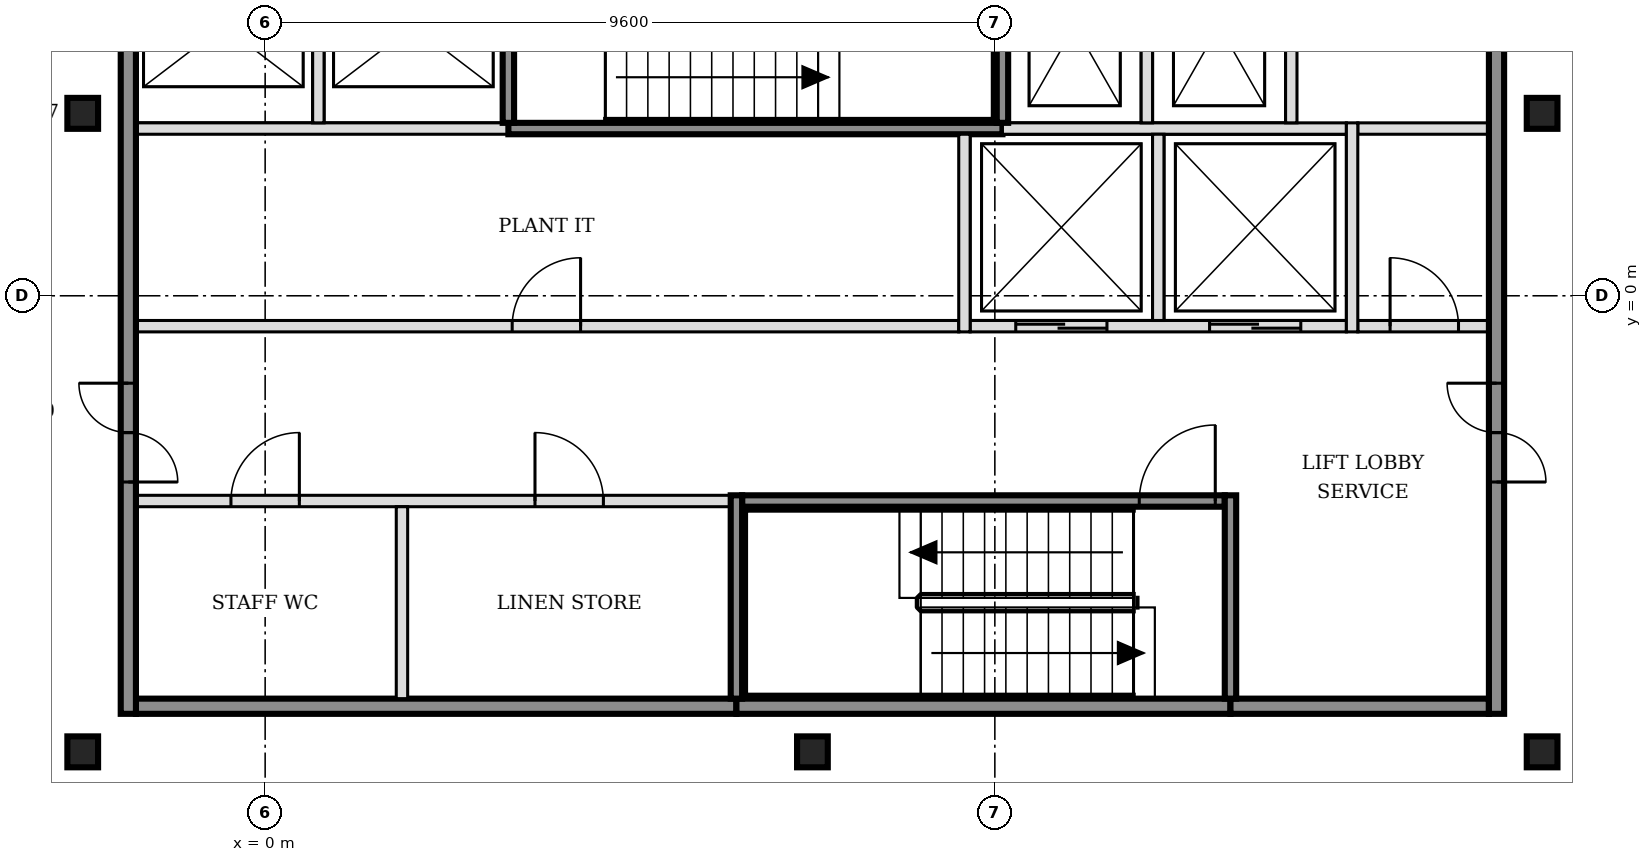
"""IFC4 building model, lengths in metres.
Left out: names, types, materials, properties, quantities, classifications, styles, units other than length and angle.
Written with IfcOpenShell. Run it as: python <this file> out.ifc"""

import sys

from ifc_helpers import new_model, si_unit, direction, frame, frame_2d, origin, origin_2d, place, context, subcontext, project, spatial, rectangle, i_section, extrude, element, fill, save


model = new_model("IFC4")
c1 = context("Model", 3, precision=1e-05, world=origin(), true_north=direction((0.0, 1.0)))
c2 = subcontext(c1, "Body", "Model", "MODEL_VIEW")
j1 = project(units=[si_unit("LENGTHUNIT", "METRE"), si_unit("PLANEANGLEUNIT", "RADIAN")], contexts=[c1])
p1 = place(None, origin())
s1 = spatial("IfcSite", under=j1, at=p1, CompositionType="ELEMENT")
p2 = place(p1, origin())
s2 = spatial("IfcBuilding", under=s1, at=p2, CompositionType="ELEMENT")
p3 = place(p2, frame((0.0, 0.0, 201.0)))
s3 = spatial("IfcBuildingStorey", under=s2, at=p3, CompositionType="ELEMENT", Elevation=201.0)
for number, where, z_axis, x_axis in (
    (1, (-2.4, -6.0, -0.15), (0.0, 0.0, 1.0), (1.0, 0.0, 0.0)),
    (2, (7.2, -6.0, -0.15), (0.0, 0.0, 1.0), (1.0, 0.0, 0.0)),
    (3, (16.8, -6.0, -0.15), (0.0, 0.0, 1.0), (1.0, 0.0, 0.0)),
    (4, (-2.4, 2.4, -0.15), (0.0, 0.0, 1.0), (1.0, 0.0, 0.0)),
    (5, (16.8, 2.4, -0.15), (0.0, 0.0, 1.0), (1.0, 0.0, 0.0)),
):
    element("IfcColumn", number, at=place(p3, frame(where, z_axis=z_axis, x_axis=x_axis)), inside=s3, PredefinedType="COLUMN", context=c2, shape_type="SweptSolid", body=[
        extrude(i_section(OverallWidth=0.404, OverallDepth=0.407, WebThickness=0.027, FlangeThickness=0.044, FilletRadius=0.015, at=origin_2d()), origin(), (0.0, 0.0, 1.0), 3.5),
    ])
p4 = place(p3, frame((-1.7, -5.4, 0.0), z_axis=(0.0, 0.0, 1.0), x_axis=(1.0, 0.0, 0.0)))
e6 = element("IfcWall", 6, at=p4, inside=s3, PredefinedType="SOLIDWALL", context=c2, shape_type="SweptSolid", body=[
    extrude(rectangle(XDim=7.9, YDim=0.2, at=frame_2d((3.95, 0.0))), origin(), (0.0, 0.0, 1.0), 3.35),
])
p5 = place(p3, frame((6.2, -5.4, 0.0), z_axis=(0.0, 0.0, 1.0), x_axis=(1.0, 0.0, 0.0)))
e7 = element("IfcWall", 7, at=p5, inside=s3, PredefinedType="SOLIDWALL", context=c2, shape_type="SweptSolid", body=[
    extrude(rectangle(XDim=6.5, YDim=0.2, at=frame_2d((3.25, 0.0))), origin(), (0.0, 0.0, 1.0), 3.35),
])
p6 = place(p3, frame((12.7, -5.4, 0.0), z_axis=(0.0, 0.0, 1.0), x_axis=(1.0, 0.0, 0.0)))
e8 = element("IfcWall", 8, at=p6, inside=s3, PredefinedType="SOLIDWALL", context=c2, shape_type="SweptSolid", body=[
    extrude(rectangle(XDim=3.4, YDim=0.2, at=frame_2d((1.7, 0.0))), origin(), (0.0, 0.0, 1.0), 3.35),
])
p7 = place(p3, frame((-1.7, -2.7, 0.0), z_axis=(0.0, 0.0, 1.0), x_axis=(1.0, 0.0, 0.0)))
e9 = element("IfcWall", 9, at=p7, inside=s3, PredefinedType="PARTITIONING", context=c2, shape_type="SweptSolid", body=[
    extrude(rectangle(XDim=7.825, YDim=0.15, at=frame_2d((3.913, 0.0))), origin(), (0.0, 0.0, 1.0), 3.35),
])
p8 = place(p7, frame((1.25, 0.0, 0.0)))
e10 = element("IfcOpeningElement", 10, at=p8, cuts=e9, PredefinedType="OPENING", context=c2, shape_type="SweptSolid", body=[
    extrude(rectangle(XDim=0.9, YDim=2.1, at=frame_2d((0.45, 1.05))), frame((0.0, 0.085, 0.0), z_axis=(0.0, -1.0, 0.0), x_axis=(1.0, 0.0, 0.0)), (0.0, 0.0, 1.0), 0.17),
])
p9 = place(p7, frame((5.25, 0.0, 0.0)))
e11 = element("IfcOpeningElement", 11, at=p9, cuts=e9, PredefinedType="OPENING", context=c2, shape_type="SweptSolid", body=[
    extrude(rectangle(XDim=0.9, YDim=2.1, at=frame_2d((0.45, 1.05))), frame((0.0, 0.085, 0.0), z_axis=(0.0, -1.0, 0.0), x_axis=(1.0, 0.0, 0.0)), (0.0, 0.0, 1.0), 0.17),
])
p10 = place(p3, frame((6.275, -2.7, 0.0), z_axis=(0.0, 0.0, 1.0), x_axis=(1.0, 0.0, 0.0)))
e12 = element("IfcWall", 12, at=p10, inside=s3, PredefinedType="SOLIDWALL", context=c2, shape_type="SweptSolid", body=[
    extrude(rectangle(XDim=6.35, YDim=0.15, at=frame_2d((3.175, 0.0))), origin(), (0.0, 0.0, 1.0), 3.35),
])
p11 = place(p10, frame((5.225, 0.0, 0.0)))
e13 = element("IfcOpeningElement", 13, at=p11, cuts=e12, PredefinedType="OPENING", context=c2, shape_type="SweptSolid", body=[
    extrude(rectangle(XDim=1.0, YDim=2.1, at=frame_2d((0.5, 1.05))), frame((0.0, 0.085, 0.0), z_axis=(0.0, -1.0, 0.0), x_axis=(1.0, 0.0, 0.0)), (0.0, 0.0, 1.0), 0.17),
])
p12 = place(p3, frame((-1.7, -0.4, 0.0), z_axis=(0.0, 0.0, 1.0), x_axis=(1.0, 0.0, 0.0)))
e14 = element("IfcWall", 14, at=p12, inside=s3, PredefinedType="PARTITIONING", context=c2, shape_type="SweptSolid", body=[
    extrude(rectangle(XDim=10.825, YDim=0.15, at=frame_2d((5.413, 0.0))), origin(), (0.0, 0.0, 1.0), 3.35),
])
p13 = place(p12, frame((4.95, 0.0, 0.0)))
e15 = element("IfcOpeningElement", 15, at=p13, cuts=e14, PredefinedType="OPENING", context=c2, shape_type="SweptSolid", body=[
    extrude(rectangle(XDim=0.9, YDim=2.1, at=frame_2d((0.45, 1.05))), frame((0.0, 0.085, 0.0), z_axis=(0.0, -1.0, 0.0), x_axis=(1.0, 0.0, 0.0)), (0.0, 0.0, 1.0), 0.17),
])
p14 = place(p3, frame((9.275, -0.4, 0.0), z_axis=(0.0, 0.0, 1.0), x_axis=(1.0, 0.0, 0.0)))
e16 = element("IfcWall", 16, at=p14, inside=s3, PredefinedType="SOLIDWALL", context=c2, shape_type="SweptSolid", body=[
    extrude(rectangle(XDim=4.95, YDim=0.15, at=frame_2d((2.475, 0.0))), origin(), (0.0, 0.0, 1.0), 3.35),
])
p15 = place(p14, frame((0.6, 0.0, 0.0)))
e17 = element("IfcOpeningElement", 17, at=p15, cuts=e16, PredefinedType="OPENING", context=c2, shape_type="SweptSolid", body=[
    extrude(rectangle(XDim=1.2, YDim=2.1, at=frame_2d((0.6, 1.05))), frame((0.0, 0.085, 0.0), z_axis=(0.0, -1.0, 0.0), x_axis=(1.0, 0.0, 0.0)), (0.0, 0.0, 1.0), 0.17),
])
p16 = place(p14, frame((3.15, 0.0, 0.0)))
e18 = element("IfcOpeningElement", 18, at=p16, cuts=e16, PredefinedType="OPENING", context=c2, shape_type="SweptSolid", body=[
    extrude(rectangle(XDim=1.2, YDim=2.1, at=frame_2d((0.6, 1.05))), frame((0.0, 0.085, 0.0), z_axis=(0.0, -1.0, 0.0), x_axis=(1.0, 0.0, 0.0)), (0.0, 0.0, 1.0), 0.17),
])
p17 = place(p3, frame((14.375, -0.4, 0.0), z_axis=(0.0, 0.0, 1.0), x_axis=(1.0, 0.0, 0.0)))
e19 = element("IfcWall", 19, at=p17, inside=s3, PredefinedType="PARTITIONING", context=c2, shape_type="SweptSolid", body=[
    extrude(rectangle(XDim=1.725, YDim=0.15, at=frame_2d((0.863, 0.0))), origin(), (0.0, 0.0, 1.0), 3.35),
])
p18 = place(p17, frame((0.425, 0.0, 0.0)))
e20 = element("IfcOpeningElement", 20, at=p18, cuts=e19, PredefinedType="OPENING", context=c2, shape_type="SweptSolid", body=[
    extrude(rectangle(XDim=0.9, YDim=2.1, at=frame_2d((0.45, 1.05))), frame((0.0, 0.085, 0.0), z_axis=(0.0, -1.0, 0.0), x_axis=(1.0, 0.0, 0.0)), (0.0, 0.0, 1.0), 0.17),
])
p19 = place(p3, frame((-1.7, 2.2, 0.0), z_axis=(0.0, 0.0, 1.0), x_axis=(1.0, 0.0, 0.0)))
e21 = element("IfcWall", 21, at=p19, inside=s3, PredefinedType="SOLIDWALL", context=c2, shape_type="SweptSolid", body=[
    extrude(rectangle(XDim=4.9, YDim=0.15, at=frame_2d((2.45, 0.0))), origin(), (0.0, 0.0, 1.0), 3.35),
])
p20 = place(p3, frame((3.2, 2.2, 0.0), z_axis=(0.0, 0.0, 1.0), x_axis=(1.0, 0.0, 0.0)))
e22 = element("IfcWall", 22, at=p20, inside=s3, PredefinedType="SOLIDWALL", context=c2, shape_type="SweptSolid", body=[
    extrude(rectangle(XDim=6.5, YDim=0.15, at=frame_2d((3.25, 0.0))), origin(), (0.0, 0.0, 1.0), 3.35),
])
p21 = place(p3, frame((9.7, 2.2, 0.0), z_axis=(0.0, 0.0, 1.0), x_axis=(1.0, 0.0, 0.0)))
e23 = element("IfcWall", 23, at=p21, inside=s3, PredefinedType="SOLIDWALL", context=c2, shape_type="SweptSolid", body=[
    extrude(rectangle(XDim=4.525, YDim=0.15, at=frame_2d((2.263, 0.0))), origin(), (0.0, 0.0, 1.0), 3.35),
])
p22 = place(p3, frame((14.375, 2.2, 0.0), z_axis=(0.0, 0.0, 1.0), x_axis=(1.0, 0.0, 0.0)))
e24 = element("IfcWall", 24, at=p22, inside=s3, PredefinedType="PARTITIONING", context=c2, shape_type="SweptSolid", body=[
    extrude(rectangle(XDim=1.725, YDim=0.15, at=frame_2d((0.863, 0.0))), origin(), (0.0, 0.0, 1.0), 3.35),
])
p23 = place(p3, frame((-1.8, -5.5, 0.0), z_axis=(0.0, 0.0, 1.0), x_axis=(0.0, 1.0, 0.0)))
e25 = element("IfcWall", 25, at=p23, inside=s3, PredefinedType="SOLIDWALL", context=c2, shape_type="SweptSolid", body=[
    extrude(rectangle(XDim=15.8, YDim=0.2, at=frame_2d((7.9, 0.0))), origin(), (0.0, 0.0, 1.0), 3.35),
])
p24 = place(p23, frame((3.05, 0.0, 0.0)))
e26 = element("IfcOpeningElement", 26, at=p24, cuts=e25, PredefinedType="OPENING", context=c2, shape_type="SweptSolid", body=[
    extrude(rectangle(XDim=1.3, YDim=2.1, at=frame_2d((0.65, 1.05))), frame((0.0, 0.11, 0.0), z_axis=(0.0, -1.0, 0.0), x_axis=(1.0, 0.0, 0.0)), (0.0, 0.0, 1.0), 0.22),
])
p25 = place(p23, frame((11.45, 0.0, 0.0)))
e27 = element("IfcOpeningElement", 27, at=p25, cuts=e25, PredefinedType="OPENING", context=c2, shape_type="SweptSolid", body=[
    extrude(rectangle(XDim=1.3, YDim=2.1, at=frame_2d((0.65, 1.05))), frame((0.0, 0.11, 0.0), z_axis=(0.0, -1.0, 0.0), x_axis=(1.0, 0.0, 0.0)), (0.0, 0.0, 1.0), 0.22),
])
p26 = place(p3, frame((0.7, 2.275, 0.0), z_axis=(0.0, 0.0, 1.0), x_axis=(0.0, 1.0, 0.0)))
e28 = element("IfcWall", 28, at=p26, inside=s3, PredefinedType="SOLIDWALL", context=c2, shape_type="SweptSolid", body=[
    extrude(rectangle(XDim=2.55, YDim=0.15, at=frame_2d((1.275, 0.0))), origin(), (0.0, 0.0, 1.0), 3.35),
])
p27 = place(p3, frame((1.8, -5.3, 0.0), z_axis=(0.0, 0.0, 1.0), x_axis=(0.0, 1.0, 0.0)))
e29 = element("IfcWall", 29, at=p27, inside=s3, PredefinedType="PARTITIONING", context=c2, shape_type="SweptSolid", body=[
    extrude(rectangle(XDim=2.525, YDim=0.15, at=frame_2d((1.263, 0.0))), origin(), (0.0, 0.0, 1.0), 3.35),
])
p28 = place(p3, frame((3.2, 2.275, 0.0), z_axis=(0.0, 0.0, 1.0), x_axis=(0.0, 1.0, 0.0)))
e30 = element("IfcWall", 30, at=p28, inside=s3, PredefinedType="SOLIDWALL", context=c2, shape_type="SweptSolid", body=[
    extrude(rectangle(XDim=2.55, YDim=0.15, at=frame_2d((1.275, 0.0))), origin(), (0.0, 0.0, 1.0), 3.35),
])
p29 = place(p3, frame((6.2, -5.3, 0.0), z_axis=(0.0, 0.0, 1.0), x_axis=(0.0, 1.0, 0.0)))
e31 = element("IfcWall", 31, at=p29, inside=s3, PredefinedType="SOLIDWALL", context=c2, shape_type="SweptSolid", body=[
    extrude(rectangle(XDim=2.675, YDim=0.15, at=frame_2d((1.337, 0.0))), origin(), (0.0, 0.0, 1.0), 3.35),
])
p30 = place(p3, frame((9.2, -0.475, 0.0), z_axis=(0.0, 0.0, 1.0), x_axis=(0.0, 1.0, 0.0)))
e32 = element("IfcWall", 32, at=p30, inside=s3, PredefinedType="SOLIDWALL", context=c2, shape_type="SweptSolid", body=[
    extrude(rectangle(XDim=2.6, YDim=0.15, at=frame_2d((1.3, 0.0))), origin(), (0.0, 0.0, 1.0), 3.35),
])
for number, where, z_axis, x_axis in (
    (33, (9.7, 2.275, 0.0), (0.0, 0.0, 1.0), (0.0, 1.0, 0.0)),
    (34, (11.6, 2.275, 0.0), (0.0, 0.0, 1.0), (0.0, 1.0, 0.0)),
):
    element("IfcWall", number, at=place(p3, frame(where, z_axis=z_axis, x_axis=x_axis)), inside=s3, PredefinedType="SOLIDWALL", context=c2, shape_type="SweptSolid", body=[
        extrude(rectangle(XDim=2.55, YDim=0.15, at=frame_2d((1.275, 0.0))), origin(), (0.0, 0.0, 1.0), 3.35),
    ])
p31 = place(p3, frame((11.75, -0.325, 0.0), z_axis=(0.0, 0.0, 1.0), x_axis=(0.0, 1.0, 0.0)))
e35 = element("IfcWall", 35, at=p31, inside=s3, PredefinedType="SOLIDWALL", context=c2, shape_type="SweptSolid", body=[
    extrude(rectangle(XDim=2.45, YDim=0.15, at=frame_2d((1.225, 0.0))), origin(), (0.0, 0.0, 1.0), 3.35),
])
p32 = place(p3, frame((12.7, -5.3, 0.0), z_axis=(0.0, 0.0, 1.0), x_axis=(0.0, 1.0, 0.0)))
e36 = element("IfcWall", 36, at=p32, inside=s3, PredefinedType="SOLIDWALL", context=c2, shape_type="SweptSolid", body=[
    extrude(rectangle(XDim=2.675, YDim=0.15, at=frame_2d((1.337, 0.0))), origin(), (0.0, 0.0, 1.0), 3.35),
])
p33 = place(p3, frame((13.5, 2.275, 0.0), z_axis=(0.0, 0.0, 1.0), x_axis=(0.0, 1.0, 0.0)))
e37 = element("IfcWall", 37, at=p33, inside=s3, PredefinedType="SOLIDWALL", context=c2, shape_type="SweptSolid", body=[
    extrude(rectangle(XDim=2.55, YDim=0.15, at=frame_2d((1.275, 0.0))), origin(), (0.0, 0.0, 1.0), 3.35),
])
p34 = place(p3, frame((14.3, -0.475, 0.0), z_axis=(0.0, 0.0, 1.0), x_axis=(0.0, 1.0, 0.0)))
e38 = element("IfcWall", 38, at=p34, inside=s3, PredefinedType="SOLIDWALL", context=c2, shape_type="SweptSolid", body=[
    extrude(rectangle(XDim=2.75, YDim=0.15, at=frame_2d((1.375, 0.0))), origin(), (0.0, 0.0, 1.0), 3.35),
])
p35 = place(p3, frame((16.2, -5.5, 0.0), z_axis=(0.0, 0.0, 1.0), x_axis=(0.0, 1.0, 0.0)))
e39 = element("IfcWall", 39, at=p35, inside=s3, PredefinedType="SOLIDWALL", context=c2, shape_type="SweptSolid", body=[
    extrude(rectangle(XDim=15.8, YDim=0.2, at=frame_2d((7.9, 0.0))), origin(), (0.0, 0.0, 1.0), 3.35),
])
p36 = place(p35, frame((3.05, 0.0, 0.0)))
e40 = element("IfcOpeningElement", 40, at=p36, cuts=e39, PredefinedType="OPENING", context=c2, shape_type="SweptSolid", body=[
    extrude(rectangle(XDim=1.3, YDim=2.1, at=frame_2d((0.65, 1.05))), frame((0.0, 0.11, 0.0), z_axis=(0.0, -1.0, 0.0), x_axis=(1.0, 0.0, 0.0)), (0.0, 0.0, 1.0), 0.22),
])
p37 = place(p35, frame((11.45, 0.0, 0.0)))
e41 = element("IfcOpeningElement", 41, at=p37, cuts=e39, PredefinedType="OPENING", context=c2, shape_type="SweptSolid", body=[
    extrude(rectangle(XDim=1.3, YDim=2.1, at=frame_2d((0.65, 1.05))), frame((0.0, 0.11, 0.0), z_axis=(0.0, -1.0, 0.0), x_axis=(1.0, 0.0, 0.0)), (0.0, 0.0, 1.0), 0.22),
])
p38 = place(p15, origin())
e42 = element("IfcDoor", 42, at=p38, inside=s3, OperationType="DOUBLE_DOOR_SLIDING", PredefinedType="DOOR", context=c2, shape_type="SweptSolid", body=[
    extrude(rectangle(XDim=1.2, YDim=2.1, at=frame_2d((0.6, 1.05))), frame((0.0, 0.025, 0.0), z_axis=(0.0, -1.0, 0.0), x_axis=(1.0, 0.0, 0.0)), (0.0, 0.0, 1.0), 0.05),
])
fill(e17, e42)
p39 = place(p16, origin())
e43 = element("IfcDoor", 43, at=p39, inside=s3, OperationType="DOUBLE_DOOR_SLIDING", PredefinedType="DOOR", context=c2, shape_type="SweptSolid", body=[
    extrude(rectangle(XDim=1.2, YDim=2.1, at=frame_2d((0.6, 1.05))), frame((0.0, 0.025, 0.0), z_axis=(0.0, -1.0, 0.0), x_axis=(1.0, 0.0, 0.0)), (0.0, 0.0, 1.0), 0.05),
])
fill(e18, e43)
p40 = place(p11, origin())
e44 = element("IfcDoor", 44, at=p40, inside=s3, OperationType="SINGLE_SWING_RIGHT", PredefinedType="DOOR", context=c2, shape_type="SweptSolid", body=[
    extrude(rectangle(XDim=1.0, YDim=2.1, at=frame_2d((0.5, 1.05))), frame((0.0, 0.025, 0.0), z_axis=(0.0, -1.0, 0.0), x_axis=(1.0, 0.0, 0.0)), (0.0, 0.0, 1.0), 0.05),
])
fill(e13, e44)
p41 = place(p24, origin())
e45 = element("IfcDoor", 45, at=p41, inside=s3, OperationType="DOUBLE_DOOR_SINGLE_SWING", PredefinedType="DOOR", context=c2, shape_type="SweptSolid", body=[
    extrude(rectangle(XDim=1.3, YDim=2.1, at=frame_2d((0.65, 1.05))), frame((0.0, 0.025, 0.0), z_axis=(0.0, -1.0, 0.0), x_axis=(1.0, 0.0, 0.0)), (0.0, 0.0, 1.0), 0.05),
])
fill(e26, e45)
p42 = place(p36, origin())
e46 = element("IfcDoor", 46, at=p42, inside=s3, OperationType="DOUBLE_DOOR_SINGLE_SWING", PredefinedType="DOOR", context=c2, shape_type="SweptSolid", body=[
    extrude(rectangle(XDim=1.3, YDim=2.1, at=frame_2d((0.65, 1.05))), frame((0.0, 0.025, 0.0), z_axis=(0.0, -1.0, 0.0), x_axis=(1.0, 0.0, 0.0)), (0.0, 0.0, 1.0), 0.05),
])
fill(e40, e46)
p43 = place(p18, origin())
e47 = element("IfcDoor", 47, at=p43, inside=s3, OperationType="SINGLE_SWING_LEFT", PredefinedType="DOOR", context=c2, shape_type="SweptSolid", body=[
    extrude(rectangle(XDim=0.9, YDim=2.1, at=frame_2d((0.45, 1.05))), frame((0.0, 0.025, 0.0), z_axis=(0.0, -1.0, 0.0), x_axis=(1.0, 0.0, 0.0)), (0.0, 0.0, 1.0), 0.05),
])
fill(e20, e47)
p44 = place(p8, origin())
e48 = element("IfcDoor", 48, at=p44, inside=s3, OperationType="SINGLE_SWING_RIGHT", PredefinedType="DOOR", context=c2, shape_type="SweptSolid", body=[
    extrude(rectangle(XDim=0.9, YDim=2.1, at=frame_2d((0.45, 1.05))), frame((0.0, 0.025, 0.0), z_axis=(0.0, -1.0, 0.0), x_axis=(1.0, 0.0, 0.0)), (0.0, 0.0, 1.0), 0.05),
])
fill(e10, e48)
p45 = place(p9, origin())
e49 = element("IfcDoor", 49, at=p45, inside=s3, OperationType="SINGLE_SWING_LEFT", PredefinedType="DOOR", context=c2, shape_type="SweptSolid", body=[
    extrude(rectangle(XDim=0.9, YDim=2.1, at=frame_2d((0.45, 1.05))), frame((0.0, 0.025, 0.0), z_axis=(0.0, -1.0, 0.0), x_axis=(1.0, 0.0, 0.0)), (0.0, 0.0, 1.0), 0.05),
])
fill(e11, e49)
p46 = place(p13, origin())
e50 = element("IfcDoor", 50, at=p46, inside=s3, OperationType="SINGLE_SWING_RIGHT", PredefinedType="DOOR", context=c2, shape_type="SweptSolid", body=[
    extrude(rectangle(XDim=0.9, YDim=2.1, at=frame_2d((0.45, 1.05))), frame((0.0, 0.025, 0.0), z_axis=(0.0, -1.0, 0.0), x_axis=(1.0, 0.0, 0.0)), (0.0, 0.0, 1.0), 0.05),
])
fill(e15, e50)
save(model, sys.argv[1])
